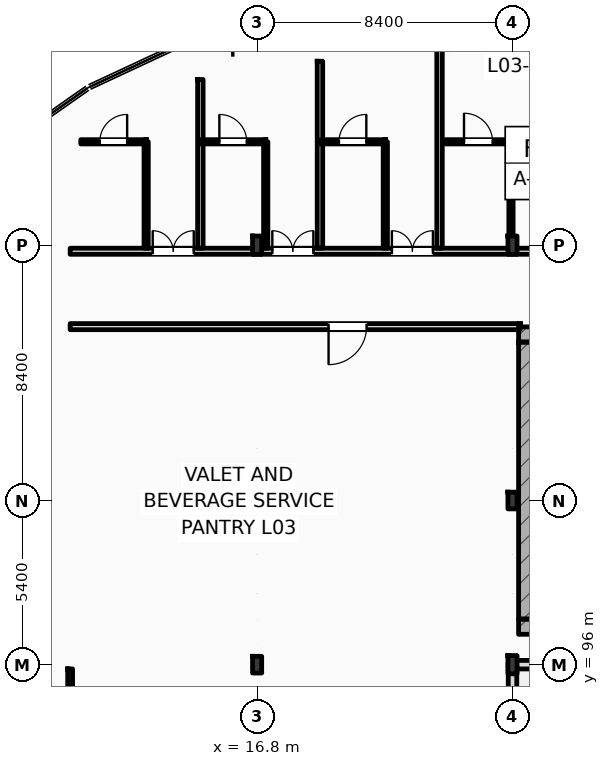
"""IFC4 building model, lengths in metres.
Left out: names, types, materials, properties, quantities, classifications, styles, units other than length and angle.
Written with IfcOpenShell. Run it as: python <this file> out.ifc"""

import sys

from ifc_helpers import new_model, si_unit, direction, frame, frame_2d, origin, origin_2d, place, context, subcontext, project, spatial, rectangle, i_section, extrude, element, fill, save


model = new_model("IFC4")
c1 = context("Model", 3, precision=1e-05, world=origin(), true_north=direction((0.0, 1.0)))
c2 = subcontext(c1, "Body", "Model", "MODEL_VIEW")
j1 = project(units=[si_unit("LENGTHUNIT", "METRE"), si_unit("PLANEANGLEUNIT", "RADIAN")], contexts=[c1])
p1 = place(None, origin())
s1 = spatial("IfcSite", under=j1, at=p1, CompositionType="ELEMENT")
p2 = place(p1, origin())
s2 = spatial("IfcBuilding", under=s1, at=p2, CompositionType="ELEMENT")
p3 = place(p2, frame((0.0, 0.0, 16.2)))
s3 = spatial("IfcBuildingStorey", under=s2, at=p3, CompositionType="ELEMENT", Elevation=16.2)
p4 = place(p3, frame((16.8, 96.0, 0.0), z_axis=(0.0, 0.0, 1.0), x_axis=(1.0, 0.0, 0.0)))
e1 = element("IfcColumn", 1, at=p4, inside=s3, PredefinedType="COLUMN", context=c2, shape_type="SweptSolid", body=[
    extrude(i_section(OverallWidth=0.3, OverallDepth=0.55, WebThickness=0.015, FlangeThickness=0.029, FilletRadius=0.027, at=origin_2d()), origin(), (0.0, 0.0, 1.0), 4.2),
])
p5 = place(p3, frame((25.2, 96.0, 0.0), z_axis=(0.0, 0.0, 1.0), x_axis=(1.0, 0.0, 0.0)))
e2 = element("IfcColumn", 2, at=p5, inside=s3, PredefinedType="COLUMN", context=c2, shape_type="SweptSolid", body=[
    extrude(i_section(OverallWidth=0.3, OverallDepth=0.6, WebThickness=0.015, FlangeThickness=0.03, FilletRadius=0.027, at=origin_2d()), origin(), (0.0, 0.0, 1.0), 4.2),
])
p6 = place(p3, frame((16.8, 101.4, 0.0), z_axis=(0.0, 0.0, 1.0), x_axis=(1.0, 0.0, 0.0)))
e3 = element("IfcColumn", 3, at=p6, inside=s3, PredefinedType="COLUMN", context=c2, shape_type="SweptSolid", body=[
    extrude(i_section(OverallWidth=0.3, OverallDepth=0.55, WebThickness=0.015, FlangeThickness=0.029, FilletRadius=0.027, at=origin_2d()), origin(), (0.0, 0.0, 1.0), 4.2),
])
p7 = place(p3, frame((16.8, 109.8, 0.0), z_axis=(0.0, 0.0, 1.0), x_axis=(1.0, 0.0, 0.0)))
e4 = element("IfcColumn", 4, at=p7, inside=s3, PredefinedType="COLUMN", context=c2, shape_type="SweptSolid", body=[
    extrude(i_section(OverallWidth=0.3, OverallDepth=0.6, WebThickness=0.015, FlangeThickness=0.03, FilletRadius=0.027, at=origin_2d()), origin(), (0.0, 0.0, 1.0), 4.2),
])
p8 = place(p3, frame((25.2, 101.4, 0.0), z_axis=(0.0, 0.0, 1.0), x_axis=(1.0, 0.0, 0.0)))
e5 = element("IfcColumn", 5, at=p8, inside=s3, PredefinedType="COLUMN", context=c2, shape_type="SweptSolid", body=[
    extrude(i_section(OverallWidth=0.3, OverallDepth=0.55, WebThickness=0.015, FlangeThickness=0.029, FilletRadius=0.027, at=origin_2d()), origin(), (0.0, 0.0, 1.0), 4.2),
])
p9 = place(p3, frame((25.2, 109.8, 0.0), z_axis=(0.0, 0.0, 1.0), x_axis=(1.0, 0.0, 0.0)))
e6 = element("IfcColumn", 6, at=p9, inside=s3, PredefinedType="COLUMN", context=c2, shape_type="SweptSolid", body=[
    extrude(i_section(OverallWidth=0.3, OverallDepth=0.6, WebThickness=0.015, FlangeThickness=0.03, FilletRadius=0.027, at=origin_2d()), origin(), (0.0, 0.0, 1.0), 4.2),
])
for number, where, z_axis, x_axis in (
    (7, (25.4, 106.862, 0.0), (0.0, 0.0, 1.0), (1.0, 0.0, 0.0)),
    (8, (25.4, 97.25, 0.0), (0.0, 0.0, 1.0), (1.0, 0.0, 0.0)),
):
    element("IfcWall", number, at=place(p3, frame(where, z_axis=z_axis, x_axis=x_axis)), inside=s3, PredefinedType="SHEAR", context=c2, shape_type="SweptSolid", body=[
        extrude(rectangle(XDim=5.16, YDim=0.5, at=frame_2d((2.58, 0.0))), origin(), (0.0, 0.0, 1.0), 4.2),
    ])
p10 = place(p3, frame((25.65, 97.5, 0.0), z_axis=(0.0, 0.0, 1.0), x_axis=(0.0, 1.0, 0.0)))
e9 = element("IfcWall", 9, at=p10, inside=s3, PredefinedType="SHEAR", context=c2, shape_type="SweptSolid", body=[
    extrude(rectangle(XDim=9.112, YDim=0.5, at=frame_2d((4.556, 0.0))), origin(), (0.0, 0.0, 1.0), 4.2),
])
p11 = place(p3, frame((25.2, 96.0, 0.0), z_axis=(0.0, 0.0, 1.0), x_axis=(1.0, 0.0, 0.0)))
e10 = element("IfcWall", 10, at=p11, inside=s3, PredefinedType="STANDARD", context=c2, shape_type="SweptSolid", body=[
    extrude(rectangle(XDim=23.4, YDim=0.28, at=frame_2d((11.7, 0.0))), origin(), (0.0, 0.0, 1.0), 3.46),
])
p12 = place(p3, frame((25.2, 79.5, 0.0), z_axis=(0.0, 0.0, 1.0), x_axis=(0.0, 1.0, 0.0)))
e11 = element("IfcWall", 11, at=p12, inside=s3, PredefinedType="STANDARD", context=c2, shape_type="SweptSolid", body=[
    extrude(rectangle(XDim=16.5, YDim=0.28, at=frame_2d((8.25, 0.0))), origin(), (0.0, 0.0, 1.0), 3.51),
])
p13 = place(p3, frame((10.65, 109.6, 0.0), z_axis=(0.0, 0.0, 1.0), x_axis=(1.0, 0.0, 0.0)))
e12 = element("IfcWall", 12, at=p13, inside=s3, PredefinedType="PARTITIONING", context=c2, shape_type="SweptSolid", body=[
    extrude(rectangle(XDim=109.21, YDim=0.2, at=frame_2d((54.605, 0.0))), origin(), (0.0, 0.0, 1.0), 3.36),
])
p14 = place(p13, frame((15.43, 0.0, 0.0)))
e13 = element("IfcOpeningElement", 13, at=p14, cuts=e12, PredefinedType="OPENING", context=c2, shape_type="SweptSolid", body=[
    extrude(rectangle(XDim=1.02, YDim=2.2, at=frame_2d((0.51, 1.1))), frame((0.0, 0.11, 0.0), z_axis=(0.0, -1.0, 0.0), x_axis=(1.0, 0.0, 0.0)), (0.0, 0.0, 1.0), 0.22),
])
p15 = place(p13, frame((19.537, 0.0, 0.0)))
e14 = element("IfcOpeningElement", 14, at=p15, cuts=e12, PredefinedType="OPENING", context=c2, shape_type="SweptSolid", body=[
    extrude(rectangle(XDim=1.02, YDim=2.2, at=frame_2d((0.51, 1.1))), frame((0.0, 0.11, 0.0), z_axis=(0.0, -1.0, 0.0), x_axis=(1.0, 0.0, 0.0)), (0.0, 0.0, 1.0), 0.22),
])
p16 = place(p13, frame((23.928, 0.0, 0.0)))
e15 = element("IfcOpeningElement", 15, at=p16, cuts=e12, PredefinedType="OPENING", context=c2, shape_type="SweptSolid", body=[
    extrude(rectangle(XDim=1.02, YDim=2.2, at=frame_2d((0.51, 1.1))), frame((0.0, 0.11, 0.0), z_axis=(0.0, -1.0, 0.0), x_axis=(1.0, 0.0, 0.0)), (0.0, 0.0, 1.0), 0.22),
])
p17 = place(p13, frame((26.169, 0.0, 0.0)))
e16 = element("IfcOpeningElement", 16, at=p17, cuts=e12, PredefinedType="OPENING", context=c2, shape_type="SweptSolid", body=[
    extrude(rectangle(XDim=1.02, YDim=2.2, at=frame_2d((0.51, 1.1))), frame((0.0, 0.11, 0.0), z_axis=(0.0, -1.0, 0.0), x_axis=(1.0, 0.0, 0.0)), (0.0, 0.0, 1.0), 0.22),
])
p18 = place(p13, frame((32.739, 0.0, 0.0)))
e17 = element("IfcOpeningElement", 17, at=p18, cuts=e12, PredefinedType="OPENING", context=c2, shape_type="SweptSolid", body=[
    extrude(rectangle(XDim=0.96, YDim=2.2, at=frame_2d((0.48, 1.1))), frame((0.0, 0.11, 0.0), z_axis=(0.0, -1.0, 0.0), x_axis=(1.0, 0.0, 0.0)), (0.0, 0.0, 1.0), 0.22),
])
p19 = place(p13, frame((34.98, 0.0, 0.0)))
e18 = element("IfcOpeningElement", 18, at=p19, cuts=e12, PredefinedType="OPENING", context=c2, shape_type="SweptSolid", body=[
    extrude(rectangle(XDim=0.96, YDim=2.2, at=frame_2d((0.48, 1.1))), frame((0.0, 0.11, 0.0), z_axis=(0.0, -1.0, 0.0), x_axis=(1.0, 0.0, 0.0)), (0.0, 0.0, 1.0), 0.22),
])
p20 = place(p13, frame((41.521, 0.0, 0.0)))
e19 = element("IfcOpeningElement", 19, at=p20, cuts=e12, PredefinedType="OPENING", context=c2, shape_type="SweptSolid", body=[
    extrude(rectangle(XDim=0.96, YDim=2.2, at=frame_2d((0.48, 1.1))), frame((0.0, 0.11, 0.0), z_axis=(0.0, -1.0, 0.0), x_axis=(1.0, 0.0, 0.0)), (0.0, 0.0, 1.0), 0.22),
])
p21 = place(p13, frame((43.512, 0.0, 0.0)))
e20 = element("IfcOpeningElement", 20, at=p21, cuts=e12, PredefinedType="OPENING", context=c2, shape_type="SweptSolid", body=[
    extrude(rectangle(XDim=0.96, YDim=2.2, at=frame_2d((0.48, 1.1))), frame((0.0, 0.11, 0.0), z_axis=(0.0, -1.0, 0.0), x_axis=(1.0, 0.0, 0.0)), (0.0, 0.0, 1.0), 0.22),
])
p22 = place(p13, frame((50.303, 0.0, 0.0)))
e21 = element("IfcOpeningElement", 21, at=p22, cuts=e12, PredefinedType="OPENING", context=c2, shape_type="SweptSolid", body=[
    extrude(rectangle(XDim=0.96, YDim=2.2, at=frame_2d((0.48, 1.1))), frame((0.0, 0.11, 0.0), z_axis=(0.0, -1.0, 0.0), x_axis=(1.0, 0.0, 0.0)), (0.0, 0.0, 1.0), 0.22),
])
p23 = place(p13, frame((54.944, 0.0, 0.0)))
e22 = element("IfcOpeningElement", 22, at=p23, cuts=e12, PredefinedType="OPENING", context=c2, shape_type="SweptSolid", body=[
    extrude(rectangle(XDim=0.96, YDim=2.2, at=frame_2d((0.48, 1.1))), frame((0.0, 0.11, 0.0), z_axis=(0.0, -1.0, 0.0), x_axis=(1.0, 0.0, 0.0)), (0.0, 0.0, 1.0), 0.22),
])
p24 = place(p13, frame((59.085, 0.0, 0.0)))
e23 = element("IfcOpeningElement", 23, at=p24, cuts=e12, PredefinedType="OPENING", context=c2, shape_type="SweptSolid", body=[
    extrude(rectangle(XDim=0.96, YDim=2.2, at=frame_2d((0.48, 1.1))), frame((0.0, 0.11, 0.0), z_axis=(0.0, -1.0, 0.0), x_axis=(1.0, 0.0, 0.0)), (0.0, 0.0, 1.0), 0.22),
])
p25 = place(p13, frame((63.476, 0.0, 0.0)))
e24 = element("IfcOpeningElement", 24, at=p25, cuts=e12, PredefinedType="OPENING", context=c2, shape_type="SweptSolid", body=[
    extrude(rectangle(XDim=0.96, YDim=2.2, at=frame_2d((0.48, 1.1))), frame((0.0, 0.11, 0.0), z_axis=(0.0, -1.0, 0.0), x_axis=(1.0, 0.0, 0.0)), (0.0, 0.0, 1.0), 0.22),
])
p26 = place(p13, frame((65.716, 0.0, 0.0)))
e25 = element("IfcOpeningElement", 25, at=p26, cuts=e12, PredefinedType="OPENING", context=c2, shape_type="SweptSolid", body=[
    extrude(rectangle(XDim=0.96, YDim=2.2, at=frame_2d((0.48, 1.1))), frame((0.0, 0.11, 0.0), z_axis=(0.0, -1.0, 0.0), x_axis=(1.0, 0.0, 0.0)), (0.0, 0.0, 1.0), 0.22),
])
p27 = place(p13, frame((72.257, 0.0, 0.0)))
e26 = element("IfcOpeningElement", 26, at=p27, cuts=e12, PredefinedType="OPENING", context=c2, shape_type="SweptSolid", body=[
    extrude(rectangle(XDim=0.96, YDim=2.2, at=frame_2d((0.48, 1.1))), frame((0.0, 0.11, 0.0), z_axis=(0.0, -1.0, 0.0), x_axis=(1.0, 0.0, 0.0)), (0.0, 0.0, 1.0), 0.22),
])
p28 = place(p13, frame((74.498, 0.0, 0.0)))
e27 = element("IfcOpeningElement", 27, at=p28, cuts=e12, PredefinedType="OPENING", context=c2, shape_type="SweptSolid", body=[
    extrude(rectangle(XDim=0.96, YDim=2.2, at=frame_2d((0.48, 1.1))), frame((0.0, 0.11, 0.0), z_axis=(0.0, -1.0, 0.0), x_axis=(1.0, 0.0, 0.0)), (0.0, 0.0, 1.0), 0.22),
])
p29 = place(p13, frame((81.039, 0.0, 0.0)))
e28 = element("IfcOpeningElement", 28, at=p29, cuts=e12, PredefinedType="OPENING", context=c2, shape_type="SweptSolid", body=[
    extrude(rectangle(XDim=0.96, YDim=2.2, at=frame_2d((0.48, 1.1))), frame((0.0, 0.11, 0.0), z_axis=(0.0, -1.0, 0.0), x_axis=(1.0, 0.0, 0.0)), (0.0, 0.0, 1.0), 0.22),
])
p30 = place(p13, frame((85.68, 0.0, 0.0)))
e29 = element("IfcOpeningElement", 29, at=p30, cuts=e12, PredefinedType="OPENING", context=c2, shape_type="SweptSolid", body=[
    extrude(rectangle(XDim=0.96, YDim=2.2, at=frame_2d((0.48, 1.1))), frame((0.0, 0.11, 0.0), z_axis=(0.0, -1.0, 0.0), x_axis=(1.0, 0.0, 0.0)), (0.0, 0.0, 1.0), 0.22),
])
p31 = place(p13, frame((89.82, 0.0, 0.0)))
e30 = element("IfcOpeningElement", 30, at=p31, cuts=e12, PredefinedType="OPENING", context=c2, shape_type="SweptSolid", body=[
    extrude(rectangle(XDim=0.96, YDim=2.2, at=frame_2d((0.48, 1.1))), frame((0.0, 0.11, 0.0), z_axis=(0.0, -1.0, 0.0), x_axis=(1.0, 0.0, 0.0)), (0.0, 0.0, 1.0), 0.22),
])
p32 = place(p13, frame((94.211, 0.0, 0.0)))
e31 = element("IfcOpeningElement", 31, at=p32, cuts=e12, PredefinedType="OPENING", context=c2, shape_type="SweptSolid", body=[
    extrude(rectangle(XDim=0.96, YDim=2.2, at=frame_2d((0.48, 1.1))), frame((0.0, 0.11, 0.0), z_axis=(0.0, -1.0, 0.0), x_axis=(1.0, 0.0, 0.0)), (0.0, 0.0, 1.0), 0.22),
])
p33 = place(p13, frame((98.602, 0.0, 0.0)))
e32 = element("IfcOpeningElement", 32, at=p33, cuts=e12, PredefinedType="OPENING", context=c2, shape_type="SweptSolid", body=[
    extrude(rectangle(XDim=0.96, YDim=2.2, at=frame_2d((0.48, 1.1))), frame((0.0, 0.11, 0.0), z_axis=(0.0, -1.0, 0.0), x_axis=(1.0, 0.0, 0.0)), (0.0, 0.0, 1.0), 0.22),
])
p34 = place(p13, frame((102.993, 0.0, 0.0)))
e33 = element("IfcOpeningElement", 33, at=p34, cuts=e12, PredefinedType="OPENING", context=c2, shape_type="SweptSolid", body=[
    extrude(rectangle(XDim=0.96, YDim=2.2, at=frame_2d((0.48, 1.1))), frame((0.0, 0.11, 0.0), z_axis=(0.0, -1.0, 0.0), x_axis=(1.0, 0.0, 0.0)), (0.0, 0.0, 1.0), 0.22),
])
p35 = place(p13, frame((105.269, 0.0, 0.0)))
e34 = element("IfcOpeningElement", 34, at=p35, cuts=e12, PredefinedType="OPENING", context=c2, shape_type="SweptSolid", body=[
    extrude(rectangle(XDim=0.96, YDim=2.2, at=frame_2d((0.48, 1.1))), frame((0.0, 0.11, 0.0), z_axis=(0.0, -1.0, 0.0), x_axis=(1.0, 0.0, 0.0)), (0.0, 0.0, 1.0), 0.22),
])
p36 = place(p13, frame((2.716, 0.0, 0.0)))
e35 = element("IfcOpeningElement", 35, at=p36, cuts=e12, PredefinedType="OPENING", context=c2, shape_type="SweptSolid", body=[
    extrude(rectangle(XDim=1.35, YDim=2.25, at=frame_2d((0.675, 1.125))), frame((0.0, 0.11, 0.0), z_axis=(0.0, -1.0, 0.0), x_axis=(1.0, 0.0, 0.0)), (0.0, 0.0, 1.0), 0.22),
])
p37 = place(p13, frame((6.65, 0.0, 0.0)))
e36 = element("IfcOpeningElement", 36, at=p37, cuts=e12, PredefinedType="OPENING", context=c2, shape_type="SweptSolid", body=[
    extrude(rectangle(XDim=1.35, YDim=2.25, at=frame_2d((0.675, 1.125))), frame((0.0, 0.11, 0.0), z_axis=(0.0, -1.0, 0.0), x_axis=(1.0, 0.0, 0.0)), (0.0, 0.0, 1.0), 0.22),
])
p38 = place(p13, frame((10.583, 0.0, 0.0)))
e37 = element("IfcOpeningElement", 37, at=p38, cuts=e12, PredefinedType="OPENING", context=c2, shape_type="SweptSolid", body=[
    extrude(rectangle(XDim=1.35, YDim=2.25, at=frame_2d((0.675, 1.125))), frame((0.0, 0.11, 0.0), z_axis=(0.0, -1.0, 0.0), x_axis=(1.0, 0.0, 0.0)), (0.0, 0.0, 1.0), 0.22),
])
p39 = place(p3, frame((10.65, 107.12, 0.0), z_axis=(0.0, 0.0, 1.0), x_axis=(1.0, 0.0, 0.0)))
e38 = element("IfcWall", 38, at=p39, inside=s3, PredefinedType="PARTITIONING", context=c2, shape_type="SweptSolid", body=[
    extrude(rectangle(XDim=14.8, YDim=0.2, at=frame_2d((7.4, 0.0))), origin(), (0.0, 0.0, 1.0), 3.92),
])
p40 = place(p39, frame((8.5, 0.0, 0.0)))
e39 = element("IfcOpeningElement", 39, at=p40, cuts=e38, PredefinedType="OPENING", context=c2, shape_type="SweptSolid", body=[
    extrude(rectangle(XDim=1.25, YDim=2.15, at=frame_2d((0.625, 1.075))), frame((0.0, 0.11, 0.0), z_axis=(0.0, -1.0, 0.0), x_axis=(1.0, 0.0, 0.0)), (0.0, 0.0, 1.0), 0.22),
])
p41 = place(p3, frame((10.65, 91.28, 0.0), z_axis=(0.0, 0.0, 1.0), x_axis=(0.0, 1.0, 0.0)))
e40 = element("IfcWall", 40, at=p41, inside=s3, PredefinedType="PARTITIONING", context=c2, shape_type="SweptSolid", body=[
    extrude(rectangle(XDim=4.58, YDim=0.16, at=frame_2d((2.29, 0.0))), origin(), (0.0, 0.0, 1.0), 3.92),
])
p42 = place(p41, frame((2.0, 0.0, 0.0)))
e41 = element("IfcOpeningElement", 41, at=p42, cuts=e40, PredefinedType="OPENING", context=c2, shape_type="SweptSolid", body=[
    extrude(rectangle(XDim=0.9, YDim=2.1, at=frame_2d((0.45, 1.05))), frame((0.0, 0.09, 0.0), z_axis=(0.0, -1.0, 0.0), x_axis=(1.0, 0.0, 0.0)), (0.0, 0.0, 1.0), 0.18),
])
p43 = place(p3, frame((25.15, 109.7, 0.0), z_axis=(0.0, 0.0, 1.0), x_axis=(0.0, 1.0, 0.0)))
e42 = element("IfcWall", 42, at=p43, inside=s3, PredefinedType="PARTITIONING", context=c2, shape_type="SweptSolid", body=[
    extrude(rectangle(XDim=3.5, YDim=0.14, at=frame_2d((1.75, 0.0))), origin(), (0.0, 0.0, 1.0), 3.51),
])
p44 = place(p3, frame((23.0, 113.2, 0.0), z_axis=(0.0, 0.0, 1.0), x_axis=(1.0, 0.0, 0.0)))
e43 = element("IfcWall", 43, at=p44, inside=s3, PredefinedType="PARTITIONING", context=c2, shape_type="SweptSolid", body=[
    extrude(rectangle(XDim=2.15, YDim=0.14, at=frame_2d((1.075, 0.0))), origin(), (0.0, 0.0, 1.0), 3.92),
])
p45 = place(p44, frame((0.605, 0.0, 0.0)))
e44 = element("IfcOpeningElement", 44, at=p45, cuts=e43, PredefinedType="OPENING", context=c2, shape_type="SweptSolid", body=[
    extrude(rectangle(XDim=0.94, YDim=2.15, at=frame_2d((0.47, 1.075))), frame((0.0, 0.08, 0.0), z_axis=(0.0, -1.0, 0.0), x_axis=(1.0, 0.0, 0.0)), (0.0, 0.0, 1.0), 0.16),
])
p46 = place(p3, frame((14.933, 109.7, 0.0), z_axis=(0.0, 0.0, 1.0), x_axis=(0.0, 1.0, 0.0)))
e45 = element("IfcWall", 45, at=p46, inside=s3, PredefinedType="PARTITIONING", context=c2, shape_type="SweptSolid", body=[
    extrude(rectangle(XDim=5.55, YDim=0.18, at=frame_2d((2.775, 0.0))), origin(), (0.0, 0.0, 1.0), 3.92),
])
p47 = place(p3, frame((13.15, 109.7, 0.0), z_axis=(0.0, 0.0, 1.0), x_axis=(0.0, 1.0, 0.0)))
e46 = element("IfcWall", 46, at=p47, inside=s3, PredefinedType="PARTITIONING", context=c2, shape_type="SweptSolid", body=[
    extrude(rectangle(XDim=3.5, YDim=0.14, at=frame_2d((1.75, 0.0))), origin(), (0.0, 0.0, 1.0), 3.92),
])
p48 = place(p3, frame((11.0, 113.2, 0.0), z_axis=(0.0, 0.0, 1.0), x_axis=(1.0, 0.0, 0.0)))
e47 = element("IfcWall", 47, at=p48, inside=s3, PredefinedType="PARTITIONING", context=c2, shape_type="SweptSolid", body=[
    extrude(rectangle(XDim=2.15, YDim=0.14, at=frame_2d((1.075, 0.0))), origin(), (0.0, 0.0, 1.0), 3.92),
])
p49 = place(p48, frame((0.625, 0.0, 0.0)))
e48 = element("IfcOpeningElement", 48, at=p49, cuts=e47, PredefinedType="OPENING", context=c2, shape_type="SweptSolid", body=[
    extrude(rectangle(XDim=0.9, YDim=2.1, at=frame_2d((0.45, 1.05))), frame((0.0, 0.08, 0.0), z_axis=(0.0, -1.0, 0.0), x_axis=(1.0, 0.0, 0.0)), (0.0, 0.0, 1.0), 0.16),
])
p50 = place(p3, frame((18.867, 109.7, 0.0), z_axis=(0.0, 0.0, 1.0), x_axis=(0.0, 1.0, 0.0)))
e49 = element("IfcWall", 49, at=p50, inside=s3, PredefinedType="PARTITIONING", context=c2, shape_type="SweptSolid", body=[
    extrude(rectangle(XDim=6.15, YDim=0.18, at=frame_2d((3.075, 0.0))), origin(), (0.0, 0.0, 1.0), 3.92),
])
p51 = place(p3, frame((17.083, 109.7, 0.0), z_axis=(0.0, 0.0, 1.0), x_axis=(0.0, 1.0, 0.0)))
e50 = element("IfcWall", 50, at=p51, inside=s3, PredefinedType="PARTITIONING", context=c2, shape_type="SweptSolid", body=[
    extrude(rectangle(XDim=3.5, YDim=0.14, at=frame_2d((1.75, 0.0))), origin(), (0.0, 0.0, 1.0), 3.92),
])
p52 = place(p3, frame((14.933, 113.2, 0.0), z_axis=(0.0, 0.0, 1.0), x_axis=(1.0, 0.0, 0.0)))
e51 = element("IfcWall", 51, at=p52, inside=s3, PredefinedType="PARTITIONING", context=c2, shape_type="SweptSolid", body=[
    extrude(rectangle(XDim=2.15, YDim=0.14, at=frame_2d((1.075, 0.0))), origin(), (0.0, 0.0, 1.0), 3.92),
])
p53 = place(p52, frame((0.625, 0.0, 0.0)))
e52 = element("IfcOpeningElement", 52, at=p53, cuts=e51, PredefinedType="OPENING", context=c2, shape_type="SweptSolid", body=[
    extrude(rectangle(XDim=0.9, YDim=2.1, at=frame_2d((0.45, 1.05))), frame((0.0, 0.08, 0.0), z_axis=(0.0, -1.0, 0.0), x_axis=(1.0, 0.0, 0.0)), (0.0, 0.0, 1.0), 0.16),
])
p54 = place(p3, frame((22.8, 109.7, 0.0), z_axis=(0.0, 0.0, 1.0), x_axis=(0.0, 1.0, 0.0)))
e53 = element("IfcWall", 53, at=p54, inside=s3, PredefinedType="PARTITIONING", context=c2, shape_type="SweptSolid", body=[
    extrude(rectangle(XDim=7.2, YDim=0.18, at=frame_2d((3.6, 0.0))), origin(), (0.0, 0.0, 1.0), 3.92),
])
p55 = place(p3, frame((21.017, 109.7, 0.0), z_axis=(0.0, 0.0, 1.0), x_axis=(0.0, 1.0, 0.0)))
e54 = element("IfcWall", 54, at=p55, inside=s3, PredefinedType="PARTITIONING", context=c2, shape_type="SweptSolid", body=[
    extrude(rectangle(XDim=3.5, YDim=0.14, at=frame_2d((1.75, 0.0))), origin(), (0.0, 0.0, 1.0), 3.92),
])
p56 = place(p3, frame((18.867, 113.2, 0.0), z_axis=(0.0, 0.0, 1.0), x_axis=(1.0, 0.0, 0.0)))
e55 = element("IfcWall", 55, at=p56, inside=s3, PredefinedType="PARTITIONING", context=c2, shape_type="SweptSolid", body=[
    extrude(rectangle(XDim=2.15, YDim=0.14, at=frame_2d((1.075, 0.0))), origin(), (0.0, 0.0, 1.0), 3.92),
])
p57 = place(p56, frame((0.625, 0.0, 0.0)))
e56 = element("IfcOpeningElement", 56, at=p57, cuts=e55, PredefinedType="OPENING", context=c2, shape_type="SweptSolid", body=[
    extrude(rectangle(XDim=0.9, YDim=2.1, at=frame_2d((0.45, 1.05))), frame((0.0, 0.08, 0.0), z_axis=(0.0, -1.0, 0.0), x_axis=(1.0, 0.0, 0.0)), (0.0, 0.0, 1.0), 0.16),
])
p58 = place(p45, origin())
e57 = element("IfcDoor", 57, at=p58, inside=s3, OperationType="SINGLE_SWING_LEFT", PredefinedType="DOOR", context=c2, shape_type="SweptSolid", body=[
    extrude(rectangle(XDim=0.94, YDim=2.15, at=frame_2d((0.47, 1.075))), frame((0.0, 0.025, 0.0), z_axis=(0.0, -1.0, 0.0), x_axis=(1.0, 0.0, 0.0)), (0.0, 0.0, 1.0), 0.05),
])
fill(e44, e57)
p59 = place(p36, origin())
e58 = element("IfcDoor", 58, at=p59, inside=s3, OperationType="DOUBLE_SWING_LEFT", PredefinedType="DOOR", context=c2, shape_type="SweptSolid", body=[
    extrude(rectangle(XDim=1.35, YDim=2.25, at=frame_2d((0.675, 1.125))), frame((0.0, 0.025, 0.0), z_axis=(0.0, -1.0, 0.0), x_axis=(1.0, 0.0, 0.0)), (0.0, 0.0, 1.0), 0.05),
])
fill(e35, e58)
p60 = place(p49, origin())
e59 = element("IfcDoor", 59, at=p60, inside=s3, OperationType="SINGLE_SWING_RIGHT", PredefinedType="DOOR", context=c2, shape_type="SweptSolid", body=[
    extrude(rectangle(XDim=0.9, YDim=2.1, at=frame_2d((0.45, 1.05))), frame((0.0, 0.025, 0.0), z_axis=(0.0, -1.0, 0.0), x_axis=(1.0, 0.0, 0.0)), (0.0, 0.0, 1.0), 0.05),
])
fill(e48, e59)
p61 = place(p37, origin())
e60 = element("IfcDoor", 60, at=p61, inside=s3, OperationType="DOUBLE_SWING_LEFT", PredefinedType="DOOR", context=c2, shape_type="SweptSolid", body=[
    extrude(rectangle(XDim=1.35, YDim=2.25, at=frame_2d((0.675, 1.125))), frame((0.0, 0.025, 0.0), z_axis=(0.0, -1.0, 0.0), x_axis=(1.0, 0.0, 0.0)), (0.0, 0.0, 1.0), 0.05),
])
fill(e36, e60)
p62 = place(p53, origin())
e61 = element("IfcDoor", 61, at=p62, inside=s3, OperationType="SINGLE_SWING_LEFT", PredefinedType="DOOR", context=c2, shape_type="SweptSolid", body=[
    extrude(rectangle(XDim=0.9, YDim=2.1, at=frame_2d((0.45, 1.05))), frame((0.0, 0.025, 0.0), z_axis=(0.0, -1.0, 0.0), x_axis=(1.0, 0.0, 0.0)), (0.0, 0.0, 1.0), 0.05),
])
fill(e52, e61)
p63 = place(p38, origin())
e62 = element("IfcDoor", 62, at=p63, inside=s3, OperationType="DOUBLE_SWING_LEFT", PredefinedType="DOOR", context=c2, shape_type="SweptSolid", body=[
    extrude(rectangle(XDim=1.35, YDim=2.25, at=frame_2d((0.675, 1.125))), frame((0.0, 0.025, 0.0), z_axis=(0.0, -1.0, 0.0), x_axis=(1.0, 0.0, 0.0)), (0.0, 0.0, 1.0), 0.05),
])
fill(e37, e62)
p64 = place(p57, origin())
e63 = element("IfcDoor", 63, at=p64, inside=s3, OperationType="SINGLE_SWING_RIGHT", PredefinedType="DOOR", context=c2, shape_type="SweptSolid", body=[
    extrude(rectangle(XDim=0.9, YDim=2.1, at=frame_2d((0.45, 1.05))), frame((0.0, 0.025, 0.0), z_axis=(0.0, -1.0, 0.0), x_axis=(1.0, 0.0, 0.0)), (0.0, 0.0, 1.0), 0.05),
])
fill(e56, e63)
p65 = place(p40, frame((1.25, 0.0, 0.0), z_axis=(0.0, 0.0, 1.0), x_axis=(-1.0, 0.0, 0.0)))
e64 = element("IfcDoor", 64, at=p65, inside=s3, OperationType="SINGLE_SWING_LEFT", PredefinedType="DOOR", context=c2, shape_type="SweptSolid", body=[
    extrude(rectangle(XDim=1.25, YDim=2.15, at=frame_2d((0.625, 1.075))), frame((0.0, 0.025, 0.0), z_axis=(0.0, -1.0, 0.0), x_axis=(1.0, 0.0, 0.0)), (0.0, 0.0, 1.0), 0.05),
])
fill(e39, e64)
save(model, sys.argv[1])
